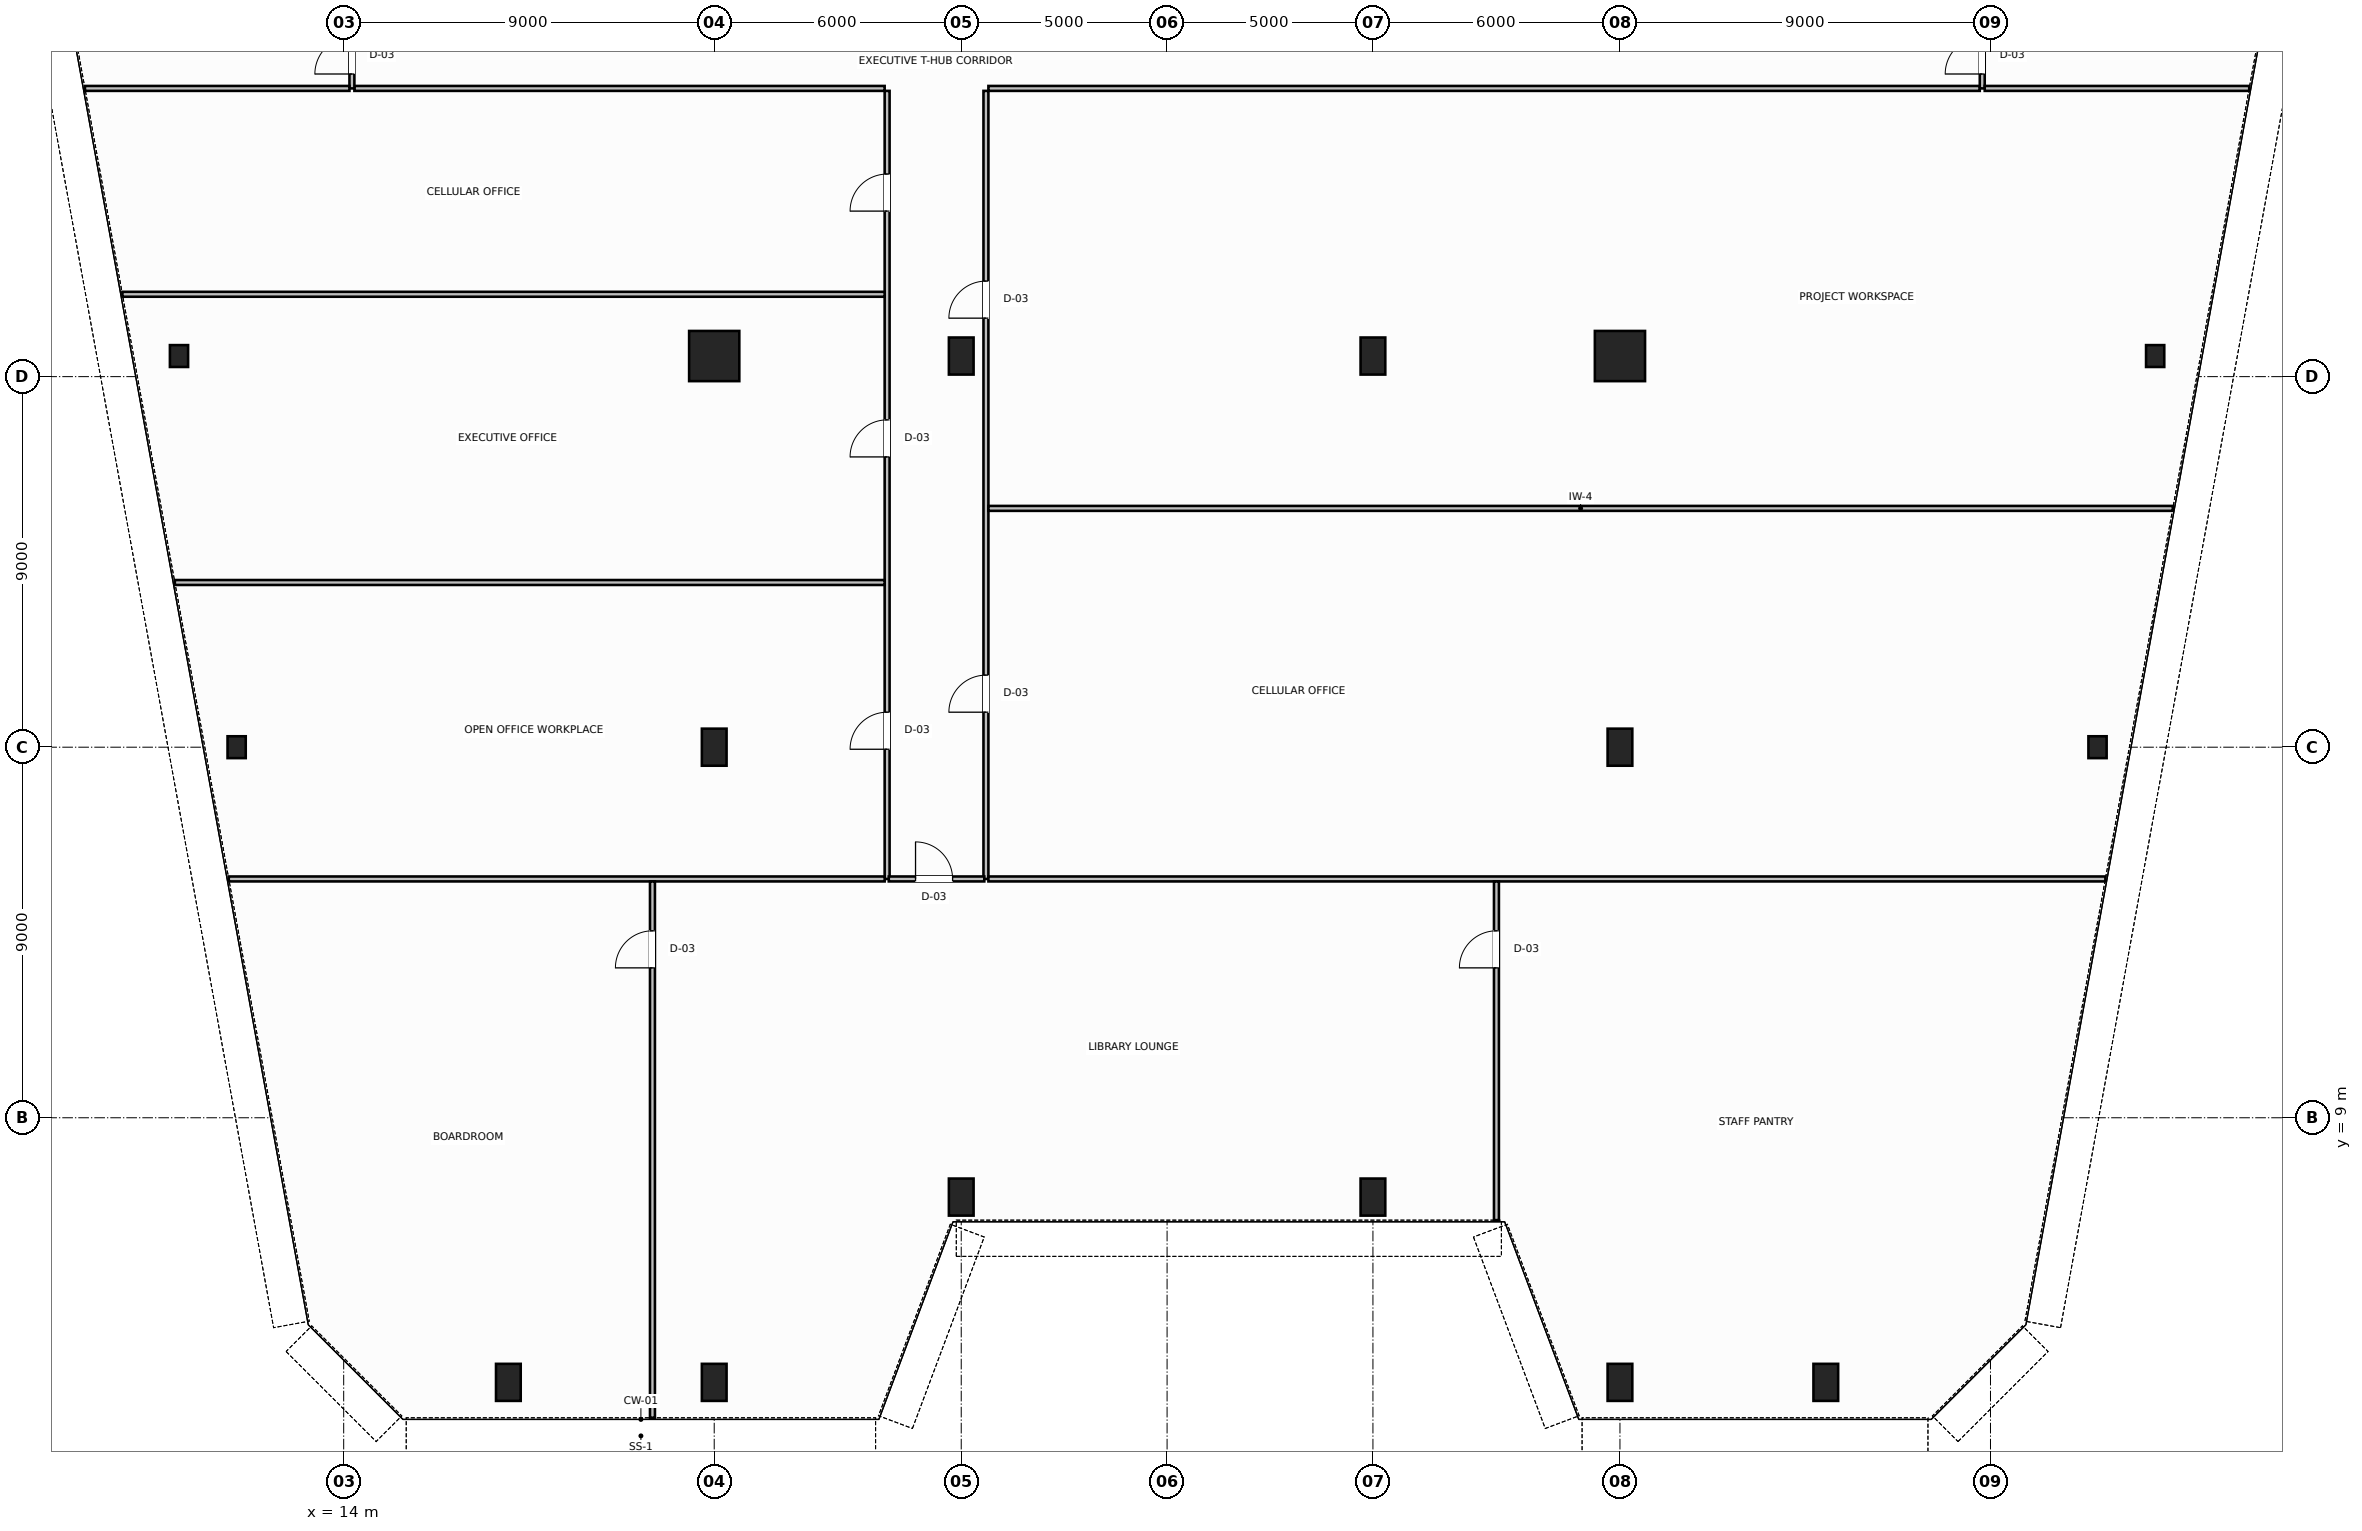
"""IFC4 building model, lengths in metres.
Left out: names, types, materials, properties, quantities, classifications, styles, units other than length and angle.
Written with IfcOpenShell. Run it as: python <this file> out.ifc"""

import sys

from ifc_helpers import new_model, si_unit, direction, frame, frame_2d, origin, origin_2d, place, context, subcontext, project, spatial, rectangle, hollow_rectangle, hollow_circle, i_section, extrude, source, transform, mapped, element, fill, save


model = new_model("IFC4")
c1 = context("Model", 3, precision=1e-05, world=origin(), true_north=direction((0.0, 1.0)))
c2 = subcontext(c1, "Body", "Model", "MODEL_VIEW")
j1 = project(units=[si_unit("LENGTHUNIT", "METRE"), si_unit("PLANEANGLEUNIT", "RADIAN")], contexts=[c1])
p1 = place(None, origin())
s1 = spatial("IfcSite", under=j1, at=p1, CompositionType="ELEMENT")
p2 = place(p1, origin())
s2 = spatial("IfcBuilding", under=s1, at=p2, CompositionType="ELEMENT")
p3 = place(p2, frame((0.0, 0.0, 45.4)))
s3 = spatial("IfcBuildingStorey", under=s2, at=p3, CompositionType="ELEMENT", Elevation=45.4)
m1 = source(origin(), c2, "Body", "SweptSolid", [
    extrude(i_section(OverallWidth=0.442, OverallDepth=0.531, WebThickness=0.065, FlangeThickness=0.076, FilletRadius=0.015, at=origin_2d()), origin(), (0.0, 0.0, 1.0), 3.8),
])
for number, where, z_axis, x_axis in (
    (1, (10.0, 27.5, 0.0), (0.0, 0.0, 1.0), (1.0, 0.0, 0.0)),
    (2, (11.4, 18.0, 0.0), (0.0, 0.0, 1.0), (1.0, 0.0, 0.0)),
    (3, (58.0, 27.5, 0.0), (0.0, 0.0, 1.0), (1.0, 0.0, 0.0)),
    (4, (56.6, 18.0, 0.0), (0.0, 0.0, 1.0), (1.0, 0.0, 0.0)),
):
    element("IfcColumn", number, at=place(p3, frame(where, z_axis=z_axis, x_axis=x_axis)), inside=s3, PredefinedType="COLUMN", context=c2, shape_type="MappedRepresentation", body=[
        mapped(m1, transform((0.0, 0.0, 0.0), scale=1.0)),
    ])
m2 = source(origin(), c2, "Body", "SweptSolid", [
    extrude(hollow_circle(Radius=0.61, WallThickness=0.05, at=origin_2d()), origin(), (0.0, 0.0, 1.0), 3.8),
])
p4 = place(p3, frame((23.0, 27.5, 0.0), z_axis=(0.0, 0.0, 1.0), x_axis=(1.0, 0.0, 0.0)))
e5 = element("IfcColumn", 5, at=p4, inside=s3, PredefinedType="COLUMN", context=c2, shape_type="MappedRepresentation", body=[
    mapped(m2, transform((0.0, 0.0, 0.0), scale=1.0)),
])
m3 = source(origin(), c2, "Body", "SweptSolid", [
    extrude(hollow_rectangle(XDim=0.6, YDim=0.9, WallThickness=0.04, InnerFilletRadius=0.04, OuterFilletRadius=0.08, at=origin_2d()), origin(), (0.0, 0.0, 1.0), 3.8),
])
for number, where, z_axis, x_axis in (
    (6, (29.0, 27.5, 0.0), (0.0, 0.0, 1.0), (1.0, 0.0, 0.0)),
    (7, (39.0, 27.5, 0.0), (0.0, 0.0, 1.0), (1.0, 0.0, 0.0)),
):
    element("IfcColumn", number, at=place(p3, frame(where, z_axis=z_axis, x_axis=x_axis)), inside=s3, PredefinedType="COLUMN", context=c2, shape_type="MappedRepresentation", body=[
        mapped(m3, transform((0.0, 0.0, 0.0), scale=1.0)),
    ])
p5 = place(p3, frame((45.0, 27.5, 0.0), z_axis=(0.0, 0.0, 1.0), x_axis=(1.0, 0.0, 0.0)))
e8 = element("IfcColumn", 8, at=p5, inside=s3, PredefinedType="COLUMN", context=c2, shape_type="MappedRepresentation", body=[
    mapped(m2, transform((0.0, 0.0, 0.0), scale=1.0)),
])
for number, where, z_axis, x_axis in (
    (9, (23.0, 18.0, 0.0), (0.0, 0.0, 1.0), (1.0, 0.0, 0.0)),
    (10, (45.0, 18.0, 0.0), (0.0, 0.0, 1.0), (1.0, 0.0, 0.0)),
):
    element("IfcColumn", number, at=place(p3, frame(where, z_axis=z_axis, x_axis=x_axis)), inside=s3, PredefinedType="COLUMN", context=c2, shape_type="MappedRepresentation", body=[
        mapped(m3, transform((0.0, 0.0, 0.0), scale=1.0)),
    ])
m4 = source(origin(), c2, "Body", "SweptSolid", [
    extrude(hollow_rectangle(XDim=0.6, YDim=0.9, WallThickness=0.04, InnerFilletRadius=0.04, OuterFilletRadius=0.08, at=origin_2d()), origin(), (0.0, 0.0, 1.0), 3.744),
])
for number, where, z_axis, x_axis in (
    (11, (18.0, 2.573, 0.032), (0.0, 0.064, 0.998), (-1.0, 0.0, 0.0)),
    (12, (23.0, 2.573, 0.032), (0.0, 0.064, 0.998), (-1.0, 0.0, 0.0)),
    (13, (29.0, 7.073, 0.032), (0.0, 0.064, 0.998), (-1.0, 0.0, 0.0)),
    (14, (39.0, 7.073, 0.032), (0.0, 0.064, 0.998), (-1.0, 0.0, 0.0)),
    (15, (45.0, 2.573, 0.032), (0.0, 0.064, 0.998), (-1.0, 0.0, 0.0)),
    (16, (50.0, 2.573, 0.032), (0.0, 0.064, 0.998), (-1.0, 0.0, 0.0)),
):
    element("IfcColumn", number, at=place(p3, frame(where, z_axis=z_axis, x_axis=x_axis)), inside=s3, PredefinedType="COLUMN", context=c2, shape_type="MappedRepresentation", body=[
        mapped(m4, transform((0.0, 0.0, 0.0), scale=1.0)),
    ])
p6 = place(p3, frame((14.26, 34.0, 0.0), z_axis=(0.0, 0.0, 1.0), x_axis=(1.0, 0.0, 0.0)))
e17 = element("IfcWall", 17, at=p6, inside=s3, PredefinedType="PARTITIONING", context=c2, shape_type="SweptSolid", body=[
    extrude(rectangle(XDim=12.88, YDim=0.12, at=frame_2d((6.44, 0.0))), origin(), (0.0, 0.0, 1.0), 3.02),
])
p7 = place(p3, frame((29.66, 34.0, 0.0), z_axis=(0.0, 0.0, 1.0), x_axis=(1.0, 0.0, 0.0)))
e18 = element("IfcWall", 18, at=p7, inside=s3, PredefinedType="PARTITIONING", context=c2, shape_type="SweptSolid", body=[
    extrude(rectangle(XDim=24.08, YDim=0.12, at=frame_2d((12.04, 0.0))), origin(), (0.0, 0.0, 1.0), 3.02),
])
p8 = place(p3, frame((14.2, 34.0, 0.0), z_axis=(0.0, 0.0, 1.0), x_axis=(0.0, 1.0, 0.0)))
e19 = element("IfcWall", 19, at=p8, inside=s3, PredefinedType="PARTITIONING", context=c2, shape_type="SweptSolid", body=[
    extrude(rectangle(XDim=2.44, YDim=0.12, at=frame_2d((1.22, 0.0))), origin(), (0.0, 0.0, 1.0), 3.58),
])
p9 = place(p8, frame((0.35, 0.0, 0.0)))
e20 = element("IfcOpeningElement", 20, at=p9, cuts=e19, PredefinedType="OPENING", context=c2, shape_type="SweptSolid", body=[
    extrude(rectangle(XDim=0.9, YDim=2.15, at=frame_2d((0.45, 1.075))), frame((0.0, 0.07, 0.0), z_axis=(0.0, -1.0, 0.0), x_axis=(1.0, 0.0, 0.0)), (0.0, 0.0, 1.0), 0.14),
])
p10 = place(p3, frame((53.8, 34.0, 0.0), z_axis=(0.0, 0.0, 1.0), x_axis=(0.0, 1.0, 0.0)))
e21 = element("IfcWall", 21, at=p10, inside=s3, PredefinedType="PARTITIONING", context=c2, shape_type="SweptSolid", body=[
    extrude(rectangle(XDim=2.44, YDim=0.12, at=frame_2d((1.22, 0.0))), origin(), (0.0, 0.0, 1.0), 3.58),
])
p11 = place(p10, frame((0.35, 0.0, 0.0)))
e22 = element("IfcOpeningElement", 22, at=p11, cuts=e21, PredefinedType="OPENING", context=c2, shape_type="SweptSolid", body=[
    extrude(rectangle(XDim=0.9, YDim=2.15, at=frame_2d((0.45, 1.075))), frame((0.0, 0.07, 0.0), z_axis=(0.0, -1.0, 0.0), x_axis=(1.0, 0.0, 0.0)), (0.0, 0.0, 1.0), 0.14),
])
p12 = place(p3, frame((27.2, 14.8, 0.0), z_axis=(0.0, 0.0, 1.0), x_axis=(0.0, 1.0, 0.0)))
e23 = element("IfcWall", 23, at=p12, inside=s3, PredefinedType="PARTITIONING", context=c2, shape_type="SweptSolid", body=[
    extrude(rectangle(XDim=19.14, YDim=0.12, at=frame_2d((9.57, 0.0))), origin(), (0.0, 0.0, 1.0), 3.58),
])
p13 = place(p12, frame((3.15, 0.0, 0.0)))
e24 = element("IfcOpeningElement", 24, at=p13, cuts=e23, PredefinedType="OPENING", context=c2, shape_type="SweptSolid", body=[
    extrude(rectangle(XDim=0.9, YDim=2.15, at=frame_2d((0.45, 1.075))), frame((0.0, 0.07, 0.0), z_axis=(0.0, -1.0, 0.0), x_axis=(1.0, 0.0, 0.0)), (0.0, 0.0, 1.0), 0.14),
])
p14 = place(p12, frame((10.25, 0.0, 0.0)))
e25 = element("IfcOpeningElement", 25, at=p14, cuts=e23, PredefinedType="OPENING", context=c2, shape_type="SweptSolid", body=[
    extrude(rectangle(XDim=0.9, YDim=2.15, at=frame_2d((0.45, 1.075))), frame((0.0, 0.07, 0.0), z_axis=(0.0, -1.0, 0.0), x_axis=(1.0, 0.0, 0.0)), (0.0, 0.0, 1.0), 0.14),
])
p15 = place(p12, frame((16.22, 0.0, 0.0)))
e26 = element("IfcOpeningElement", 26, at=p15, cuts=e23, PredefinedType="OPENING", context=c2, shape_type="SweptSolid", body=[
    extrude(rectangle(XDim=0.9, YDim=2.15, at=frame_2d((0.45, 1.075))), frame((0.0, 0.07, 0.0), z_axis=(0.0, -1.0, 0.0), x_axis=(1.0, 0.0, 0.0)), (0.0, 0.0, 1.0), 0.14),
])
p16 = place(p3, frame((29.6, 14.8, 0.0), z_axis=(0.0, 0.0, 1.0), x_axis=(0.0, 1.0, 0.0)))
e27 = element("IfcWall", 27, at=p16, inside=s3, PredefinedType="PARTITIONING", context=c2, shape_type="SweptSolid", body=[
    extrude(rectangle(XDim=19.14, YDim=0.12, at=frame_2d((9.57, 0.0))), origin(), (0.0, 0.0, 1.0), 3.58),
])
p17 = place(p16, frame((4.05, 0.0, 0.0)))
e28 = element("IfcOpeningElement", 28, at=p17, cuts=e27, PredefinedType="OPENING", context=c2, shape_type="SweptSolid", body=[
    extrude(rectangle(XDim=0.9, YDim=2.15, at=frame_2d((0.45, 1.075))), frame((0.0, 0.07, 0.0), z_axis=(0.0, -1.0, 0.0), x_axis=(1.0, 0.0, 0.0)), (0.0, 0.0, 1.0), 0.14),
])
p18 = place(p16, frame((13.62, 0.0, 0.0)))
e29 = element("IfcOpeningElement", 29, at=p18, cuts=e27, PredefinedType="OPENING", context=c2, shape_type="SweptSolid", body=[
    extrude(rectangle(XDim=0.9, YDim=2.15, at=frame_2d((0.45, 1.075))), frame((0.0, 0.07, 0.0), z_axis=(0.0, -1.0, 0.0), x_axis=(1.0, 0.0, 0.0)), (0.0, 0.0, 1.0), 0.14),
])
p19 = place(p3, frame((27.24, 14.8, 0.0), z_axis=(0.0, 0.0, 1.0), x_axis=(1.0, 0.0, 0.0)))
e30 = element("IfcWall", 30, at=p19, inside=s3, PredefinedType="PARTITIONING", context=c2, shape_type="SweptSolid", body=[
    extrude(rectangle(XDim=2.32, YDim=0.12, at=frame_2d((1.16, 0.0))), origin(), (0.0, 0.0, 1.0), 3.58),
])
p20 = place(p19, frame((0.65, 0.0, 0.0)))
e31 = element("IfcOpeningElement", 31, at=p20, cuts=e30, PredefinedType="OPENING", context=c2, shape_type="SweptSolid", body=[
    extrude(rectangle(XDim=0.9, YDim=2.15, at=frame_2d((0.45, 1.075))), frame((0.0, 0.07, 0.0), z_axis=(0.0, -1.0, 0.0), x_axis=(1.0, 0.0, 0.0)), (0.0, 0.0, 1.0), 0.14),
])
for number, where, z_axis, x_axis in (
    (32, (7.715, 34.0, 0.0), (0.0, 0.0, 1.0), (1.0, 0.0, 0.0)),
    (33, (53.86, 34.0, 0.0), (0.0, 0.0, 1.0), (1.0, 0.0, 0.0)),
):
    element("IfcWall", number, at=place(p3, frame(where, z_axis=z_axis, x_axis=x_axis)), inside=s3, PredefinedType="PARTITIONING", context=c2, shape_type="SweptSolid", body=[
        extrude(rectangle(XDim=6.425, YDim=0.12, at=frame_2d((3.212, 0.0))), origin(), (0.0, 0.0, 1.0), 3.02),
    ])
p21 = place(p3, frame((9.899, 22.0, 0.0), z_axis=(0.0, 0.0, 1.0), x_axis=(1.0, 0.0, 0.0)))
e34 = element("IfcWall", 34, at=p21, inside=s3, PredefinedType="PARTITIONING", context=c2, shape_type="SweptSolid", body=[
    extrude(rectangle(XDim=17.241, YDim=0.12, at=frame_2d((8.621, 0.0))), origin(), (0.0, 0.0, 1.0), 3.58),
])
p22 = place(p3, frame((8.625, 29.0, 0.0), z_axis=(0.0, 0.0, 1.0), x_axis=(1.0, 0.0, 0.0)))
e35 = element("IfcWall", 35, at=p22, inside=s3, PredefinedType="PARTITIONING", context=c2, shape_type="SweptSolid", body=[
    extrude(rectangle(XDim=18.515, YDim=0.12, at=frame_2d((9.258, 0.0))), origin(), (0.0, 0.0, 1.0), 3.58),
])
p23 = place(p3, frame((29.66, 23.8, 0.0), z_axis=(0.0, 0.0, 1.0), x_axis=(1.0, 0.0, 0.0)))
e36 = element("IfcWall", 36, at=p23, inside=s3, PredefinedType="PARTITIONING", context=c2, shape_type="SweptSolid", body=[
    extrude(rectangle(XDim=28.769, YDim=0.12, at=frame_2d((14.385, 0.0))), origin(), (0.0, 0.0, 1.0), 3.58),
])
p24 = place(p3, frame((11.209, 14.8, 0.0), z_axis=(0.0, 0.0, 1.0), x_axis=(1.0, 0.0, 0.0)))
e37 = element("IfcWall", 37, at=p24, inside=s3, PredefinedType="PARTITIONING", context=c2, shape_type="SweptSolid", body=[
    extrude(rectangle(XDim=15.931, YDim=0.12, at=frame_2d((7.966, 0.0))), origin(), (0.0, 0.0, 1.0), 3.58),
])
p25 = place(p3, frame((29.66, 14.8, 0.0), z_axis=(0.0, 0.0, 1.0), x_axis=(1.0, 0.0, 0.0)))
e38 = element("IfcWall", 38, at=p25, inside=s3, PredefinedType="PARTITIONING", context=c2, shape_type="SweptSolid", body=[
    extrude(rectangle(XDim=27.131, YDim=0.12, at=frame_2d((13.566, 0.0))), origin(), (0.0, 0.0, 1.0), 3.58),
])
p26 = place(p3, frame((21.5, 1.713, 0.0), z_axis=(0.0, 0.0, 1.0), x_axis=(0.0, 1.0, 0.0)))
e39 = element("IfcWall", 39, at=p26, inside=s3, PredefinedType="PARTITIONING", context=c2, shape_type="SweptSolid", body=[
    extrude(rectangle(XDim=13.027, YDim=0.12, at=frame_2d((6.513, 0.0))), origin(), (0.0, 0.0, 1.0), 3.58),
])
p27 = place(p26, frame((10.927, 0.0, 0.0)))
e40 = element("IfcOpeningElement", 40, at=p27, cuts=e39, PredefinedType="OPENING", context=c2, shape_type="SweptSolid", body=[
    extrude(rectangle(XDim=0.9, YDim=2.15, at=frame_2d((0.45, 1.075))), frame((0.0, 0.07, 0.0), z_axis=(0.0, -1.0, 0.0), x_axis=(1.0, 0.0, 0.0)), (0.0, 0.0, 1.0), 0.14),
])
p28 = place(p3, frame((42.0, 6.513, 0.0), z_axis=(0.0, 0.0, 1.0), x_axis=(0.0, 1.0, 0.0)))
e41 = element("IfcWall", 41, at=p28, inside=s3, PredefinedType="PARTITIONING", context=c2, shape_type="SweptSolid", body=[
    extrude(rectangle(XDim=8.227, YDim=0.12, at=frame_2d((4.113, 0.0))), origin(), (0.0, 0.0, 1.0), 3.58),
])
p29 = place(p28, frame((6.127, 0.0, 0.0)))
e42 = element("IfcOpeningElement", 42, at=p29, cuts=e41, PredefinedType="OPENING", context=c2, shape_type="SweptSolid", body=[
    extrude(rectangle(XDim=0.9, YDim=2.15, at=frame_2d((0.45, 1.075))), frame((0.0, 0.07, 0.0), z_axis=(0.0, -1.0, 0.0), x_axis=(1.0, 0.0, 0.0)), (0.0, 0.0, 1.0), 0.14),
])
m5 = source(origin(), c2, "Body", "SweptSolid", [
    extrude(rectangle(XDim=0.9, YDim=2.15, at=frame_2d((0.45, 1.075))), frame((0.0, 0.025, 0.0), z_axis=(0.0, -1.0, 0.0), x_axis=(1.0, 0.0, 0.0)), (0.0, 0.0, 1.0), 0.05),
])
p30 = place(p9, origin())
e43 = element("IfcDoor", 43, at=p30, inside=s3, OperationType="SINGLE_SWING_LEFT", PredefinedType="DOOR", context=c2, shape_type="MappedRepresentation", body=[
    mapped(m5, transform((0.0, 0.0, 0.0), scale=1.0)),
])
fill(e20, e43)
p31 = place(p11, origin())
e44 = element("IfcDoor", 44, at=p31, inside=s3, OperationType="SINGLE_SWING_RIGHT", PredefinedType="DOOR", context=c2, shape_type="MappedRepresentation", body=[
    mapped(m5, transform((0.0, 0.0, 0.0), scale=1.0)),
])
fill(e22, e44)
p32 = place(p13, origin())
e45 = element("IfcDoor", 45, at=p32, inside=s3, OperationType="SINGLE_SWING_LEFT", PredefinedType="DOOR", context=c2, shape_type="MappedRepresentation", body=[
    mapped(m5, transform((0.0, 0.0, 0.0), scale=1.0)),
])
fill(e24, e45)
p33 = place(p14, origin())
e46 = element("IfcDoor", 46, at=p33, inside=s3, OperationType="SINGLE_SWING_RIGHT", PredefinedType="DOOR", context=c2, shape_type="MappedRepresentation", body=[
    mapped(m5, transform((0.0, 0.0, 0.0), scale=1.0)),
])
fill(e25, e46)
p34 = place(p15, origin())
e47 = element("IfcDoor", 47, at=p34, inside=s3, OperationType="SINGLE_SWING_LEFT", PredefinedType="DOOR", context=c2, shape_type="MappedRepresentation", body=[
    mapped(m5, transform((0.0, 0.0, 0.0), scale=1.0)),
])
fill(e26, e47)
p35 = place(p17, origin())
e48 = element("IfcDoor", 48, at=p35, inside=s3, OperationType="SINGLE_SWING_RIGHT", PredefinedType="DOOR", context=c2, shape_type="MappedRepresentation", body=[
    mapped(m5, transform((0.0, 0.0, 0.0), scale=1.0)),
])
fill(e28, e48)
p36 = place(p18, origin())
e49 = element("IfcDoor", 49, at=p36, inside=s3, OperationType="SINGLE_SWING_LEFT", PredefinedType="DOOR", context=c2, shape_type="MappedRepresentation", body=[
    mapped(m5, transform((0.0, 0.0, 0.0), scale=1.0)),
])
fill(e29, e49)
p37 = place(p27, origin())
e50 = element("IfcDoor", 50, at=p37, inside=s3, OperationType="SINGLE_SWING_RIGHT", PredefinedType="DOOR", context=c2, shape_type="MappedRepresentation", body=[
    mapped(m5, transform((0.0, 0.0, 0.0), scale=1.0)),
])
fill(e40, e50)
p38 = place(p20, origin())
e51 = element("IfcDoor", 51, at=p38, inside=s3, OperationType="SINGLE_SWING_LEFT", PredefinedType="DOOR", context=c2, shape_type="MappedRepresentation", body=[
    mapped(m5, transform((0.0, 0.0, 0.0), scale=1.0)),
])
fill(e31, e51)
p39 = place(p29, origin())
e52 = element("IfcDoor", 52, at=p39, inside=s3, OperationType="SINGLE_SWING_LEFT", PredefinedType="DOOR", context=c2, shape_type="MappedRepresentation", body=[
    mapped(m5, transform((0.0, 0.0, 0.0), scale=1.0)),
])
fill(e42, e52)
save(model, sys.argv[1])
